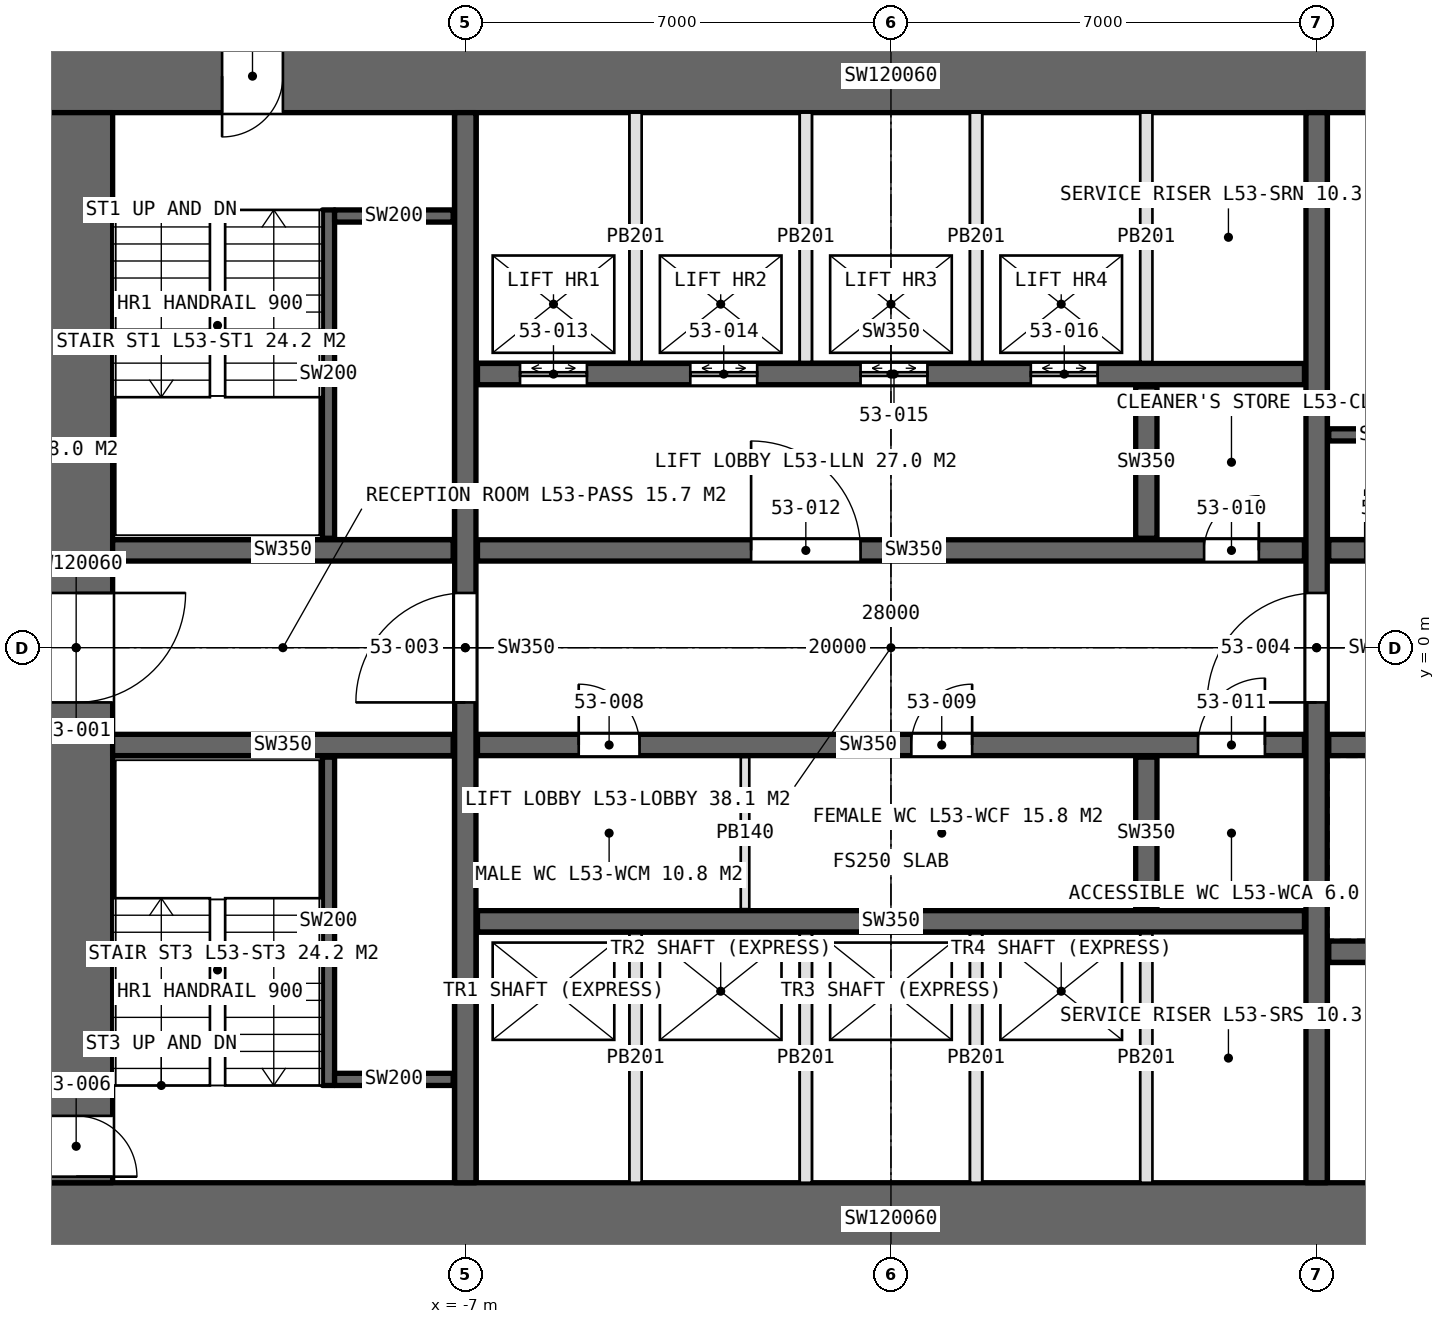
"""IFC4 building model, lengths in metres.
Left out: names, types, materials, properties, quantities, classifications, styles, units other than length and angle.
Written with IfcOpenShell. Run it as: python <this file> out.ifc"""

import sys

from ifc_helpers import new_model, si_unit, direction, frame, frame_2d, origin, place, context, subcontext, project, spatial, rectangle, extrude, element, fill, save


model = new_model("IFC4")
c1 = context("Model", 3, precision=1e-05, world=origin(), true_north=direction((0.0, 1.0)))
c2 = subcontext(c1, "Body", "Model", "MODEL_VIEW")
j1 = project(units=[si_unit("LENGTHUNIT", "METRE"), si_unit("PLANEANGLEUNIT", "RADIAN")], contexts=[c1])
p1 = place(None, origin())
s1 = spatial("IfcSite", under=j1, at=p1, CompositionType="ELEMENT")
p2 = place(p1, origin())
s2 = spatial("IfcBuilding", under=s1, at=p2, CompositionType="ELEMENT")
p3 = place(p2, frame((0.0, 0.0, 241.0)))
s3 = spatial("IfcBuildingStorey", under=s2, at=p3, CompositionType="ELEMENT", Elevation=241.0)
p4 = place(p3, frame((-14.0, -9.4, 0.0), z_axis=(0.0, 0.0, 1.0), x_axis=(1.0, 0.0, 0.0)))
e1 = element("IfcWall", 1, at=p4, inside=s3, PredefinedType="SHEAR", context=c2, shape_type="SweptSolid", body=[
    extrude(rectangle(XDim=28.0, YDim=1.2, at=frame_2d((14.0, 0.0))), origin(), (0.0, 0.0, 1.0), 4.2),
])
p5 = place(p4, frame((22.9, 0.0, 0.0)))
e2 = element("IfcOpeningElement", 2, at=p5, cuts=e1, PredefinedType="OPENING", context=c2, shape_type="SweptSolid", body=[
    extrude(rectangle(XDim=2.2, YDim=2.7, at=frame_2d((1.1, 1.35))), frame((0.0, 0.61, 0.0), z_axis=(0.0, -1.0, 0.0), x_axis=(1.0, 0.0, 0.0)), (0.0, 0.0, 1.0), 1.22),
])
p6 = place(p3, frame((14.0, 9.4, 0.0), z_axis=(0.0, 0.0, 1.0), x_axis=(-1.0, 0.0, 0.0)))
e3 = element("IfcWall", 3, at=p6, inside=s3, PredefinedType="SHEAR", context=c2, shape_type="SweptSolid", body=[
    extrude(rectangle(XDim=28.0, YDim=1.2, at=frame_2d((14.0, 0.0))), origin(), (0.0, 0.0, 1.0), 4.2),
])
p7 = place(p6, frame((24.0, 0.0, 0.0)))
e4 = element("IfcOpeningElement", 4, at=p7, cuts=e3, PredefinedType="OPENING", context=c2, shape_type="SweptSolid", body=[
    extrude(rectangle(XDim=1.0, YDim=2.4, at=frame_2d((0.5, 1.2))), frame((0.0, 0.61, 0.0), z_axis=(0.0, -1.0, 0.0), x_axis=(1.0, 0.0, 0.0)), (0.0, 0.0, 1.0), 1.22),
])
p8 = place(p3, frame((-13.4, 8.8, 0.0), z_axis=(0.0, 0.0, 1.0), x_axis=(0.0, -1.0, 0.0)))
e5 = element("IfcWall", 5, at=p8, inside=s3, PredefinedType="SHEAR", context=c2, shape_type="SweptSolid", body=[
    extrude(rectangle(XDim=17.6, YDim=1.2, at=frame_2d((8.8, 0.0))), origin(), (0.0, 0.0, 1.0), 4.2),
])
p9 = place(p8, frame((7.9, 0.0, 0.0)))
e6 = element("IfcOpeningElement", 6, at=p9, cuts=e5, PredefinedType="OPENING", context=c2, shape_type="SweptSolid", body=[
    extrude(rectangle(XDim=1.8, YDim=2.4, at=frame_2d((0.9, 1.2))), frame((0.0, 0.61, 0.0), z_axis=(0.0, -1.0, 0.0), x_axis=(1.0, 0.0, 0.0)), (0.0, 0.0, 1.0), 1.22),
])
p10 = place(p8, frame((16.5, 0.0, 0.0)))
e7 = element("IfcOpeningElement", 7, at=p10, cuts=e5, PredefinedType="OPENING", context=c2, shape_type="SweptSolid", body=[
    extrude(rectangle(XDim=1.0, YDim=2.4, at=frame_2d((0.5, 1.2))), frame((0.0, 0.61, 0.0), z_axis=(0.0, -1.0, 0.0), x_axis=(1.0, 0.0, 0.0)), (0.0, 0.0, 1.0), 1.22),
])
p11 = place(p3, frame((-7.0, -8.8, 0.0), z_axis=(0.0, 0.0, 1.0), x_axis=(0.0, 1.0, 0.0)))
e8 = element("IfcWall", 8, at=p11, inside=s3, PredefinedType="SHEAR", context=c2, shape_type="SweptSolid", body=[
    extrude(rectangle(XDim=17.6, YDim=0.35, at=frame_2d((8.8, 0.0))), origin(), (0.0, 0.0, 1.0), 4.2),
])
p12 = place(p11, frame((7.9, 0.0, 0.0)))
e9 = element("IfcOpeningElement", 9, at=p12, cuts=e8, PredefinedType="OPENING", context=c2, shape_type="SweptSolid", body=[
    extrude(rectangle(XDim=1.8, YDim=2.4, at=frame_2d((0.9, 1.2))), frame((0.0, 0.185, 0.0), z_axis=(0.0, -1.0, 0.0), x_axis=(1.0, 0.0, 0.0)), (0.0, 0.0, 1.0), 0.37),
])
p13 = place(p3, frame((7.0, -8.8, 0.0), z_axis=(0.0, 0.0, 1.0), x_axis=(0.0, 1.0, 0.0)))
e10 = element("IfcWall", 10, at=p13, inside=s3, PredefinedType="SHEAR", context=c2, shape_type="SweptSolid", body=[
    extrude(rectangle(XDim=17.6, YDim=0.35, at=frame_2d((8.8, 0.0))), origin(), (0.0, 0.0, 1.0), 4.2),
])
p14 = place(p13, frame((7.9, 0.0, 0.0)))
e11 = element("IfcOpeningElement", 11, at=p14, cuts=e10, PredefinedType="OPENING", context=c2, shape_type="SweptSolid", body=[
    extrude(rectangle(XDim=1.8, YDim=2.4, at=frame_2d((0.9, 1.2))), frame((0.0, 0.185, 0.0), z_axis=(0.0, -1.0, 0.0), x_axis=(1.0, 0.0, 0.0)), (0.0, 0.0, 1.0), 0.37),
])
p15 = place(p3, frame((-6.8, 1.6, 0.0), z_axis=(0.0, 0.0, 1.0), x_axis=(1.0, 0.0, 0.0)))
e12 = element("IfcWall", 12, at=p15, inside=s3, PredefinedType="SHEAR", context=c2, shape_type="SweptSolid", body=[
    extrude(rectangle(XDim=13.6, YDim=0.35, at=frame_2d((6.8, 0.0))), origin(), (0.0, 0.0, 1.0), 4.2),
])
p16 = place(p15, frame((11.95, 0.0, 0.0)))
e13 = element("IfcOpeningElement", 13, at=p16, cuts=e12, PredefinedType="OPENING", context=c2, shape_type="SweptSolid", body=[
    extrude(rectangle(XDim=0.9, YDim=2.4, at=frame_2d((0.45, 1.2))), frame((0.0, 0.185, 0.0), z_axis=(0.0, -1.0, 0.0), x_axis=(1.0, 0.0, 0.0)), (0.0, 0.0, 1.0), 0.37),
])
p17 = place(p15, frame((4.5, 0.0, 0.0)))
e14 = element("IfcOpeningElement", 14, at=p17, cuts=e12, PredefinedType="OPENING", context=c2, shape_type="SweptSolid", body=[
    extrude(rectangle(XDim=1.8, YDim=2.4, at=frame_2d((0.9, 1.2))), frame((0.0, 0.185, 0.0), z_axis=(0.0, -1.0, 0.0), x_axis=(1.0, 0.0, 0.0)), (0.0, 0.0, 1.0), 0.37),
])
p18 = place(p3, frame((-6.8, -1.6, 0.0), z_axis=(0.0, 0.0, 1.0), x_axis=(1.0, 0.0, 0.0)))
e15 = element("IfcWall", 15, at=p18, inside=s3, PredefinedType="SHEAR", context=c2, shape_type="SweptSolid", body=[
    extrude(rectangle(XDim=13.6, YDim=0.35, at=frame_2d((6.8, 0.0))), origin(), (0.0, 0.0, 1.0), 4.2),
])
p19 = place(p18, frame((1.665, 0.0, 0.0)))
e16 = element("IfcOpeningElement", 16, at=p19, cuts=e15, PredefinedType="OPENING", context=c2, shape_type="SweptSolid", body=[
    extrude(rectangle(XDim=1.0, YDim=2.4, at=frame_2d((0.5, 1.2))), frame((0.0, 0.185, 0.0), z_axis=(0.0, -1.0, 0.0), x_axis=(1.0, 0.0, 0.0)), (0.0, 0.0, 1.0), 0.37),
])
p20 = place(p18, frame((7.135, 0.0, 0.0)))
e17 = element("IfcOpeningElement", 17, at=p20, cuts=e15, PredefinedType="OPENING", context=c2, shape_type="SweptSolid", body=[
    extrude(rectangle(XDim=1.0, YDim=2.4, at=frame_2d((0.5, 1.2))), frame((0.0, 0.185, 0.0), z_axis=(0.0, -1.0, 0.0), x_axis=(1.0, 0.0, 0.0)), (0.0, 0.0, 1.0), 0.37),
])
p21 = place(p18, frame((11.85, 0.0, 0.0)))
e18 = element("IfcOpeningElement", 18, at=p21, cuts=e15, PredefinedType="OPENING", context=c2, shape_type="SweptSolid", body=[
    extrude(rectangle(XDim=1.1, YDim=2.4, at=frame_2d((0.55, 1.2))), frame((0.0, 0.185, 0.0), z_axis=(0.0, -1.0, 0.0), x_axis=(1.0, 0.0, 0.0)), (0.0, 0.0, 1.0), 0.37),
])
p22 = place(p3, frame((-6.8, 4.5, 0.0), z_axis=(0.0, 0.0, 1.0), x_axis=(1.0, 0.0, 0.0)))
e19 = element("IfcWall", 19, at=p22, inside=s3, PredefinedType="SHEAR", context=c2, shape_type="SweptSolid", body=[
    extrude(rectangle(XDim=13.6, YDim=0.35, at=frame_2d((6.8, 0.0))), origin(), (0.0, 0.0, 1.0), 4.2),
])
p23 = place(p22, frame((0.7, 0.0, 0.0)))
e20 = element("IfcOpeningElement", 20, at=p23, cuts=e19, PredefinedType="OPENING", context=c2, shape_type="SweptSolid", body=[
    extrude(rectangle(XDim=1.1, YDim=2.4, at=frame_2d((0.55, 1.2))), frame((0.0, 0.185, 0.0), z_axis=(0.0, -1.0, 0.0), x_axis=(1.0, 0.0, 0.0)), (0.0, 0.0, 1.0), 0.37),
])
p24 = place(p22, frame((3.5, 0.0, 0.0)))
e21 = element("IfcOpeningElement", 21, at=p24, cuts=e19, PredefinedType="OPENING", context=c2, shape_type="SweptSolid", body=[
    extrude(rectangle(XDim=1.1, YDim=2.4, at=frame_2d((0.55, 1.2))), frame((0.0, 0.185, 0.0), z_axis=(0.0, -1.0, 0.0), x_axis=(1.0, 0.0, 0.0)), (0.0, 0.0, 1.0), 0.37),
])
p25 = place(p22, frame((6.3, 0.0, 0.0)))
e22 = element("IfcOpeningElement", 22, at=p25, cuts=e19, PredefinedType="OPENING", context=c2, shape_type="SweptSolid", body=[
    extrude(rectangle(XDim=1.1, YDim=2.4, at=frame_2d((0.55, 1.2))), frame((0.0, 0.185, 0.0), z_axis=(0.0, -1.0, 0.0), x_axis=(1.0, 0.0, 0.0)), (0.0, 0.0, 1.0), 0.37),
])
p26 = place(p22, frame((9.1, 0.0, 0.0)))
e23 = element("IfcOpeningElement", 23, at=p26, cuts=e19, PredefinedType="OPENING", context=c2, shape_type="SweptSolid", body=[
    extrude(rectangle(XDim=1.1, YDim=2.4, at=frame_2d((0.55, 1.2))), frame((0.0, 0.185, 0.0), z_axis=(0.0, -1.0, 0.0), x_axis=(1.0, 0.0, 0.0)), (0.0, 0.0, 1.0), 0.37),
])
p27 = place(p3, frame((-6.8, -4.5, 0.0), z_axis=(0.0, 0.0, 1.0), x_axis=(1.0, 0.0, 0.0)))
e24 = element("IfcWall", 24, at=p27, inside=s3, PredefinedType="SHEAR", context=c2, shape_type="SweptSolid", body=[
    extrude(rectangle(XDim=13.6, YDim=0.35, at=frame_2d((6.8, 0.0))), origin(), (0.0, 0.0, 1.0), 4.2),
])
for number, where, z_axis, x_axis in (
    (25, (-12.8, 1.6, 0.0), (0.0, 0.0, 1.0), (1.0, 0.0, 0.0)),
    (26, (-12.8, -1.6, 0.0), (0.0, 0.0, 1.0), (1.0, 0.0, 0.0)),
):
    element("IfcWall", number, at=place(p3, frame(where, z_axis=z_axis, x_axis=x_axis)), inside=s3, PredefinedType="SHEAR", context=c2, shape_type="SweptSolid", body=[
        extrude(rectangle(XDim=5.6, YDim=0.35, at=frame_2d((2.8, 0.0))), origin(), (0.0, 0.0, 1.0), 4.2),
    ])
p28 = place(p3, frame((7.2, 1.6, 0.0), z_axis=(0.0, 0.0, 1.0), x_axis=(1.0, 0.0, 0.0)))
e27 = element("IfcWall", 27, at=p28, inside=s3, PredefinedType="SHEAR", context=c2, shape_type="SweptSolid", body=[
    extrude(rectangle(XDim=5.6, YDim=0.35, at=frame_2d((2.8, 0.0))), origin(), (0.0, 0.0, 1.0), 4.2),
])
p29 = place(p28, frame((0.6, 0.0, 0.0)))
e28 = element("IfcOpeningElement", 28, at=p29, cuts=e27, PredefinedType="OPENING", context=c2, shape_type="SweptSolid", body=[
    extrude(rectangle(XDim=1.0, YDim=2.4, at=frame_2d((0.5, 1.2))), frame((0.0, 0.185, 0.0), z_axis=(0.0, -1.0, 0.0), x_axis=(1.0, 0.0, 0.0)), (0.0, 0.0, 1.0), 0.37),
])
p30 = place(p3, frame((7.2, -1.6, 0.0), z_axis=(0.0, 0.0, 1.0), x_axis=(1.0, 0.0, 0.0)))
e29 = element("IfcWall", 29, at=p30, inside=s3, PredefinedType="SHEAR", context=c2, shape_type="SweptSolid", body=[
    extrude(rectangle(XDim=5.6, YDim=0.35, at=frame_2d((2.8, 0.0))), origin(), (0.0, 0.0, 1.0), 4.2),
])
p31 = place(p30, frame((0.9, 0.0, 0.0)))
e30 = element("IfcOpeningElement", 30, at=p31, cuts=e29, PredefinedType="OPENING", context=c2, shape_type="SweptSolid", body=[
    extrude(rectangle(XDim=1.3, YDim=2.4, at=frame_2d((0.65, 1.2))), frame((0.0, 0.185, 0.0), z_axis=(0.0, -1.0, 0.0), x_axis=(1.0, 0.0, 0.0)), (0.0, 0.0, 1.0), 0.37),
])
p32 = place(p30, frame((3.9, 0.0, 0.0)))
e31 = element("IfcOpeningElement", 31, at=p32, cuts=e29, PredefinedType="OPENING", context=c2, shape_type="SweptSolid", body=[
    extrude(rectangle(XDim=1.3, YDim=2.4, at=frame_2d((0.65, 1.2))), frame((0.0, 0.185, 0.0), z_axis=(0.0, -1.0, 0.0), x_axis=(1.0, 0.0, 0.0)), (0.0, 0.0, 1.0), 0.37),
])
p33 = place(p3, frame((7.2, -5.0, 0.0), z_axis=(0.0, 0.0, 1.0), x_axis=(1.0, 0.0, 0.0)))
e32 = element("IfcWall", 32, at=p33, inside=s3, PredefinedType="SHEAR", context=c2, shape_type="SweptSolid", body=[
    extrude(rectangle(XDim=5.6, YDim=0.35, at=frame_2d((2.8, 0.0))), origin(), (0.0, 0.0, 1.0), 4.2),
])
for number, where, z_axis, x_axis in (
    (33, (4.2, 1.8, 0.0), (0.0, 0.0, 1.0), (0.0, 1.0, 0.0)),
    (34, (4.2, -4.3, 0.0), (0.0, 0.0, 1.0), (0.0, 1.0, 0.0)),
):
    element("IfcWall", number, at=place(p3, frame(where, z_axis=z_axis, x_axis=x_axis)), inside=s3, PredefinedType="SHEAR", context=c2, shape_type="SweptSolid", body=[
        extrude(rectangle(XDim=2.5, YDim=0.35, at=frame_2d((1.25, 0.0))), origin(), (0.0, 0.0, 1.0), 4.2),
    ])
p34 = place(p3, frame((-2.4, -1.8, 0.0), z_axis=(0.0, 0.0, 1.0), x_axis=(0.0, -1.0, 0.0)))
e35 = element("IfcWall", 35, at=p34, inside=s3, PredefinedType="PARTITIONING", context=c2, shape_type="SweptSolid", body=[
    extrude(rectangle(XDim=2.5, YDim=0.14, at=frame_2d((1.25, 0.0))), origin(), (0.0, 0.0, 1.0), 3.95),
])
for number, where, z_axis, x_axis in (
    (36, (-4.2, 4.7, 0.0), (0.0, 0.0, 1.0), (0.0, 1.0, 0.0)),
    (37, (-1.4, 4.7, 0.0), (0.0, 0.0, 1.0), (0.0, 1.0, 0.0)),
    (38, (1.4, 4.7, 0.0), (0.0, 0.0, 1.0), (0.0, 1.0, 0.0)),
    (39, (4.2, 4.7, 0.0), (0.0, 0.0, 1.0), (0.0, 1.0, 0.0)),
    (40, (-4.2, -4.7, 0.0), (0.0, 0.0, 1.0), (0.0, -1.0, 0.0)),
    (41, (-1.4, -4.7, 0.0), (0.0, 0.0, 1.0), (0.0, -1.0, 0.0)),
    (42, (1.4, -4.7, 0.0), (0.0, 0.0, 1.0), (0.0, -1.0, 0.0)),
    (43, (4.2, -4.7, 0.0), (0.0, 0.0, 1.0), (0.0, -1.0, 0.0)),
):
    element("IfcWall", number, at=place(p3, frame(where, z_axis=z_axis, x_axis=x_axis)), inside=s3, PredefinedType="PARTITIONING", context=c2, shape_type="SweptSolid", body=[
        extrude(rectangle(XDim=4.1, YDim=0.2, at=frame_2d((2.05, 0.0))), origin(), (0.0, 0.0, 1.0), 4.2),
    ])
p35 = place(p3, frame((-9.25, 7.2, 0.0), z_axis=(0.0, 0.0, 1.0), x_axis=(0.0, -1.0, 0.0)))
e44 = element("IfcWall", 44, at=p35, inside=s3, PredefinedType="SOLIDWALL", context=c2, shape_type="SweptSolid", body=[
    extrude(rectangle(XDim=5.4, YDim=0.2, at=frame_2d((2.7, 0.0))), origin(), (0.0, 0.0, 1.0), 4.2),
])
p36 = place(p3, frame((-9.15, 7.1, 0.0), z_axis=(0.0, 0.0, 1.0), x_axis=(1.0, 0.0, 0.0)))
e45 = element("IfcWall", 45, at=p36, inside=s3, PredefinedType="SOLIDWALL", context=c2, shape_type="SweptSolid", body=[
    extrude(rectangle(XDim=1.95, YDim=0.2, at=frame_2d((0.975, 0.0))), origin(), (0.0, 0.0, 1.0), 4.2),
])
p37 = place(p3, frame((-9.25, -7.2, 0.0), z_axis=(0.0, 0.0, 1.0), x_axis=(0.0, 1.0, 0.0)))
e46 = element("IfcWall", 46, at=p37, inside=s3, PredefinedType="SOLIDWALL", context=c2, shape_type="SweptSolid", body=[
    extrude(rectangle(XDim=5.4, YDim=0.2, at=frame_2d((2.7, 0.0))), origin(), (0.0, 0.0, 1.0), 4.2),
])
for number, where, z_axis, x_axis in (
    (47, (-9.15, -7.1, 0.0), (0.0, 0.0, 1.0), (1.0, 0.0, 0.0)),
    (48, (9.15, 3.5, 0.0), (0.0, 0.0, 1.0), (-1.0, 0.0, 0.0)),
):
    element("IfcWall", number, at=place(p3, frame(where, z_axis=z_axis, x_axis=x_axis)), inside=s3, PredefinedType="SOLIDWALL", context=c2, shape_type="SweptSolid", body=[
        extrude(rectangle(XDim=1.95, YDim=0.2, at=frame_2d((0.975, 0.0))), origin(), (0.0, 0.0, 1.0), 4.2),
    ])
p38 = place(p9, origin())
e49 = element("IfcDoor", 49, at=p38, inside=s3, OperationType="DOUBLE_DOOR_SINGLE_SWING", PredefinedType="DOOR", context=c2, shape_type="SweptSolid", body=[
    extrude(rectangle(XDim=1.8, YDim=2.4, at=frame_2d((0.9, 1.2))), frame((0.0, 0.025, 0.0), z_axis=(0.0, -1.0, 0.0), x_axis=(1.0, 0.0, 0.0)), (0.0, 0.0, 1.0), 0.05),
])
fill(e6, e49)
p39 = place(p12, origin())
e50 = element("IfcDoor", 50, at=p39, inside=s3, OperationType="DOUBLE_DOOR_SINGLE_SWING", PredefinedType="DOOR", context=c2, shape_type="SweptSolid", body=[
    extrude(rectangle(XDim=1.8, YDim=2.4, at=frame_2d((0.9, 1.2))), frame((0.0, 0.025, 0.0), z_axis=(0.0, -1.0, 0.0), x_axis=(1.0, 0.0, 0.0)), (0.0, 0.0, 1.0), 0.05),
])
fill(e9, e50)
p40 = place(p14, origin())
e51 = element("IfcDoor", 51, at=p40, inside=s3, OperationType="DOUBLE_DOOR_SINGLE_SWING", PredefinedType="DOOR", context=c2, shape_type="SweptSolid", body=[
    extrude(rectangle(XDim=1.8, YDim=2.4, at=frame_2d((0.9, 1.2))), frame((0.0, 0.025, 0.0), z_axis=(0.0, -1.0, 0.0), x_axis=(1.0, 0.0, 0.0)), (0.0, 0.0, 1.0), 0.05),
])
fill(e11, e51)
p41 = place(p7, origin())
e52 = element("IfcDoor", 52, at=p41, inside=s3, OperationType="SINGLE_SWING_RIGHT", PredefinedType="DOOR", context=c2, shape_type="SweptSolid", body=[
    extrude(rectangle(XDim=1.0, YDim=2.4, at=frame_2d((0.5, 1.2))), frame((0.0, 0.025, 0.0), z_axis=(0.0, -1.0, 0.0), x_axis=(1.0, 0.0, 0.0)), (0.0, 0.0, 1.0), 0.05),
])
fill(e4, e52)
p42 = place(p10, origin())
e53 = element("IfcDoor", 53, at=p42, inside=s3, OperationType="SINGLE_SWING_RIGHT", PredefinedType="DOOR", context=c2, shape_type="SweptSolid", body=[
    extrude(rectangle(XDim=1.0, YDim=2.4, at=frame_2d((0.5, 1.2))), frame((0.0, 0.025, 0.0), z_axis=(0.0, -1.0, 0.0), x_axis=(1.0, 0.0, 0.0)), (0.0, 0.0, 1.0), 0.05),
])
fill(e7, e53)
p43 = place(p19, origin())
e54 = element("IfcDoor", 54, at=p43, inside=s3, OperationType="SINGLE_SWING_LEFT", PredefinedType="DOOR", context=c2, shape_type="SweptSolid", body=[
    extrude(rectangle(XDim=1.0, YDim=2.4, at=frame_2d((0.5, 1.2))), frame((0.0, 0.025, 0.0), z_axis=(0.0, -1.0, 0.0), x_axis=(1.0, 0.0, 0.0)), (0.0, 0.0, 1.0), 0.05),
])
fill(e16, e54)
p44 = place(p20, origin())
e55 = element("IfcDoor", 55, at=p44, inside=s3, OperationType="SINGLE_SWING_RIGHT", PredefinedType="DOOR", context=c2, shape_type="SweptSolid", body=[
    extrude(rectangle(XDim=1.0, YDim=2.4, at=frame_2d((0.5, 1.2))), frame((0.0, 0.025, 0.0), z_axis=(0.0, -1.0, 0.0), x_axis=(1.0, 0.0, 0.0)), (0.0, 0.0, 1.0), 0.05),
])
fill(e17, e55)
p45 = place(p16, origin())
e56 = element("IfcDoor", 56, at=p45, inside=s3, OperationType="SINGLE_SWING_RIGHT", PredefinedType="DOOR", context=c2, shape_type="SweptSolid", body=[
    extrude(rectangle(XDim=0.9, YDim=2.4, at=frame_2d((0.45, 1.2))), frame((0.0, 0.025, 0.0), z_axis=(0.0, -1.0, 0.0), x_axis=(1.0, 0.0, 0.0)), (0.0, 0.0, 1.0), 0.05),
])
fill(e13, e56)
p46 = place(p21, origin())
e57 = element("IfcDoor", 57, at=p46, inside=s3, OperationType="SINGLE_SWING_RIGHT", PredefinedType="DOOR", context=c2, shape_type="SweptSolid", body=[
    extrude(rectangle(XDim=1.1, YDim=2.4, at=frame_2d((0.55, 1.2))), frame((0.0, 0.025, 0.0), z_axis=(0.0, -1.0, 0.0), x_axis=(1.0, 0.0, 0.0)), (0.0, 0.0, 1.0), 0.05),
])
fill(e18, e57)
p47 = place(p17, origin())
e58 = element("IfcDoor", 58, at=p47, inside=s3, OperationType="DOUBLE_DOOR_SINGLE_SWING", PredefinedType="DOOR", context=c2, shape_type="SweptSolid", body=[
    extrude(rectangle(XDim=1.8, YDim=2.4, at=frame_2d((0.9, 1.2))), frame((0.0, 0.025, 0.0), z_axis=(0.0, -1.0, 0.0), x_axis=(1.0, 0.0, 0.0)), (0.0, 0.0, 1.0), 0.05),
])
fill(e14, e58)
p48 = place(p23, origin())
e59 = element("IfcDoor", 59, at=p48, inside=s3, OperationType="DOUBLE_DOOR_SLIDING", PredefinedType="DOOR", context=c2, shape_type="SweptSolid", body=[
    extrude(rectangle(XDim=1.1, YDim=2.4, at=frame_2d((0.55, 1.2))), frame((0.0, 0.025, 0.0), z_axis=(0.0, -1.0, 0.0), x_axis=(1.0, 0.0, 0.0)), (0.0, 0.0, 1.0), 0.05),
])
fill(e20, e59)
p49 = place(p24, origin())
e60 = element("IfcDoor", 60, at=p49, inside=s3, OperationType="DOUBLE_DOOR_SLIDING", PredefinedType="DOOR", context=c2, shape_type="SweptSolid", body=[
    extrude(rectangle(XDim=1.1, YDim=2.4, at=frame_2d((0.55, 1.2))), frame((0.0, 0.025, 0.0), z_axis=(0.0, -1.0, 0.0), x_axis=(1.0, 0.0, 0.0)), (0.0, 0.0, 1.0), 0.05),
])
fill(e21, e60)
p50 = place(p25, origin())
e61 = element("IfcDoor", 61, at=p50, inside=s3, OperationType="DOUBLE_DOOR_SLIDING", PredefinedType="DOOR", context=c2, shape_type="SweptSolid", body=[
    extrude(rectangle(XDim=1.1, YDim=2.4, at=frame_2d((0.55, 1.2))), frame((0.0, 0.025, 0.0), z_axis=(0.0, -1.0, 0.0), x_axis=(1.0, 0.0, 0.0)), (0.0, 0.0, 1.0), 0.05),
])
fill(e22, e61)
p51 = place(p26, origin())
e62 = element("IfcDoor", 62, at=p51, inside=s3, OperationType="DOUBLE_DOOR_SLIDING", PredefinedType="DOOR", context=c2, shape_type="SweptSolid", body=[
    extrude(rectangle(XDim=1.1, YDim=2.4, at=frame_2d((0.55, 1.2))), frame((0.0, 0.025, 0.0), z_axis=(0.0, -1.0, 0.0), x_axis=(1.0, 0.0, 0.0)), (0.0, 0.0, 1.0), 0.05),
])
fill(e23, e62)
save(model, sys.argv[1])
